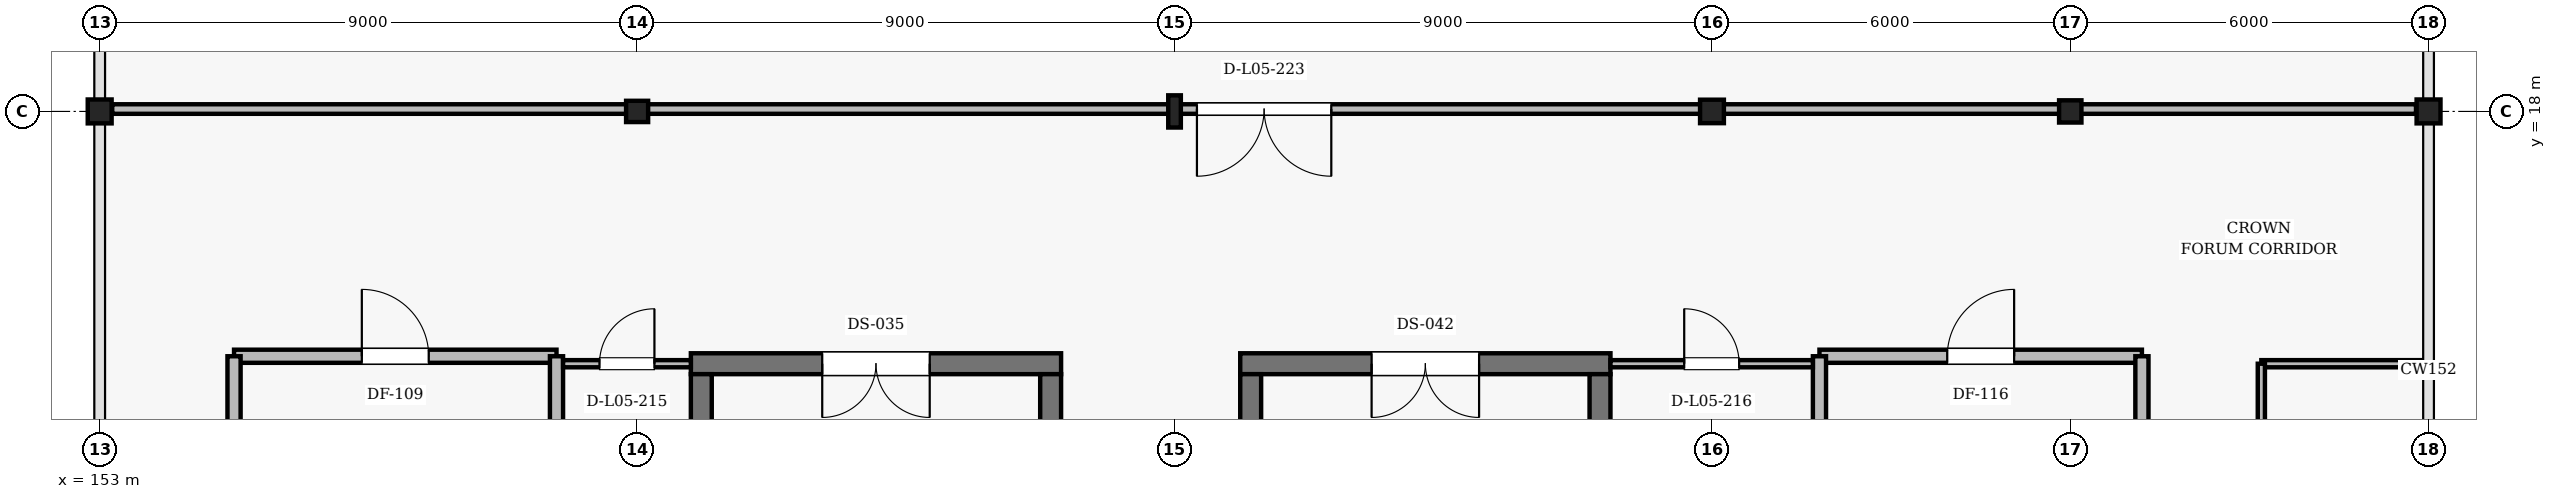
"""IFC4 building model, lengths in metres.
Left out: names, types, materials, properties, quantities, classifications, styles, units other than length and angle.
Written with IfcOpenShell. Run it as: python <this file> out.ifc"""

import sys

from ifc_helpers import new_model, si_unit, direction, frame, frame_2d, origin, origin_2d, place, context, subcontext, project, spatial, rectangle, hollow_rectangle, i_section, extrude, element, fill, save


model = new_model("IFC4")
c1 = context("Model", 3, precision=1e-05, world=origin(), true_north=direction((0.0, 1.0)))
c2 = subcontext(c1, "Body", "Model", "MODEL_VIEW")
j1 = project(units=[si_unit("LENGTHUNIT", "METRE"), si_unit("PLANEANGLEUNIT", "RADIAN")], contexts=[c1])
p1 = place(None, origin())
s1 = spatial("IfcSite", under=j1, at=p1, CompositionType="ELEMENT")
p2 = place(p1, origin())
s2 = spatial("IfcBuilding", under=s1, at=p2, CompositionType="ELEMENT")
p3 = place(p2, frame((0.0, 0.0, 25.2)))
s3 = spatial("IfcBuildingStorey", under=s2, at=p3, CompositionType="ELEMENT", Elevation=25.2)
p4 = place(p3, frame((153.0, 18.0, 0.0), z_axis=(0.0, 0.0, 1.0), x_axis=(1.0, 0.0, 0.0)))
e1 = element("IfcColumn", 1, at=p4, inside=s3, PredefinedType="COLUMN", context=c2, shape_type="SweptSolid", body=[
    extrude(hollow_rectangle(XDim=0.4, YDim=0.4, WallThickness=0.016, InnerFilletRadius=0.016, OuterFilletRadius=0.032, at=origin_2d()), origin(), (0.0, 0.0, 1.0), 4.8),
])
p5 = place(p3, frame((162.0, 18.0, 0.0), z_axis=(0.0, 0.0, 1.0), x_axis=(1.0, 0.0, 0.0)))
e2 = element("IfcColumn", 2, at=p5, inside=s3, PredefinedType="COLUMN", context=c2, shape_type="SweptSolid", body=[
    extrude(i_section(OverallWidth=0.369, OverallDepth=0.356, WebThickness=0.011, FlangeThickness=0.018, FilletRadius=0.015, at=origin_2d()), origin(), (0.0, 0.0, 1.0), 4.8),
])
p6 = place(p3, frame((171.0, 18.0, 0.0), z_axis=(0.0, 0.0, 1.0), x_axis=(1.0, 0.0, 0.0)))
e3 = element("IfcColumn", 3, at=p6, inside=s3, PredefinedType="COLUMN", context=c2, shape_type="SweptSolid", body=[
    extrude(i_section(OverallWidth=0.211, OverallDepth=0.539, WebThickness=0.012, FlangeThickness=0.019, FilletRadius=0.014, at=origin_2d()), origin(), (0.0, 0.0, 1.0), 4.8),
])
p7 = place(p3, frame((180.0, 18.0, 0.0), z_axis=(0.0, 0.0, 1.0), x_axis=(1.0, 0.0, 0.0)))
e4 = element("IfcColumn", 4, at=p7, inside=s3, PredefinedType="COLUMN", context=c2, shape_type="SweptSolid", body=[
    extrude(i_section(OverallWidth=0.399, OverallDepth=0.393, WebThickness=0.023, FlangeThickness=0.037, FilletRadius=0.018, at=origin_2d()), origin(), (0.0, 0.0, 1.0), 4.8),
])
p8 = place(p3, frame((186.0, 18.0, 0.0), z_axis=(0.0, 0.0, 1.0), x_axis=(1.0, 0.0, 0.0)))
e5 = element("IfcColumn", 5, at=p8, inside=s3, PredefinedType="COLUMN", context=c2, shape_type="SweptSolid", body=[
    extrude(i_section(OverallWidth=0.374, OverallDepth=0.372, WebThickness=0.016, FlangeThickness=0.026, FilletRadius=0.016, at=origin_2d()), origin(), (0.0, 0.0, 1.0), 4.8),
])
p9 = place(p3, frame((192.0, 18.0, 0.0), z_axis=(0.0, 0.0, 1.0), x_axis=(1.0, 0.0, 0.0)))
e6 = element("IfcColumn", 6, at=p9, inside=s3, PredefinedType="COLUMN", context=c2, shape_type="SweptSolid", body=[
    extrude(hollow_rectangle(XDim=0.4, YDim=0.4, WallThickness=0.016, InnerFilletRadius=0.016, OuterFilletRadius=0.032, at=origin_2d()), origin(), (0.0, 0.0, 1.0), 4.8),
])
p10 = place(p3, frame((169.1, 13.775, 0.0), z_axis=(0.0, 0.0, 1.0), x_axis=(-1.0, 0.0, 0.0)))
e7 = element("IfcWall", 7, at=p10, inside=s3, PredefinedType="SHEAR", context=c2, shape_type="SweptSolid", body=[
    extrude(rectangle(XDim=6.2, YDim=0.35, at=frame_2d((3.1, 0.0))), origin(), (0.0, 0.0, 1.0), 4.8),
])
p11 = place(p10, frame((2.2, 0.0, 0.0)))
e8 = element("IfcOpeningElement", 8, at=p11, cuts=e7, PredefinedType="OPENING", context=c2, shape_type="SweptSolid", body=[
    extrude(rectangle(XDim=1.8, YDim=2.2, at=frame_2d((0.9, 1.1))), frame((0.0, 0.185, 0.0), z_axis=(0.0, -1.0, 0.0), x_axis=(1.0, 0.0, 0.0)), (0.0, 0.0, 1.0), 0.37),
])
for number, where, z_axis, x_axis in (
    (9, (163.075, 13.6, 0.0), (0.0, 0.0, 1.0), (0.0, -1.0, 0.0)),
    (10, (168.925, 2.2, 0.0), (0.0, 0.0, 1.0), (0.0, 1.0, 0.0)),
):
    element("IfcWall", number, at=place(p3, frame(where, z_axis=z_axis, x_axis=x_axis)), inside=s3, PredefinedType="SHEAR", context=c2, shape_type="SweptSolid", body=[
        extrude(rectangle(XDim=11.4, YDim=0.35, at=frame_2d((5.7, 0.0))), origin(), (0.0, 0.0, 1.0), 4.8),
    ])
p12 = place(p3, frame((178.3, 13.775, 0.0), z_axis=(0.0, 0.0, 1.0), x_axis=(-1.0, 0.0, 0.0)))
e11 = element("IfcWall", 11, at=p12, inside=s3, PredefinedType="SHEAR", context=c2, shape_type="SweptSolid", body=[
    extrude(rectangle(XDim=6.2, YDim=0.35, at=frame_2d((3.1, 0.0))), origin(), (0.0, 0.0, 1.0), 4.8),
])
p13 = place(p12, frame((2.2, 0.0, 0.0)))
e12 = element("IfcOpeningElement", 12, at=p13, cuts=e11, PredefinedType="OPENING", context=c2, shape_type="SweptSolid", body=[
    extrude(rectangle(XDim=1.8, YDim=2.2, at=frame_2d((0.9, 1.1))), frame((0.0, 0.185, 0.0), z_axis=(0.0, -1.0, 0.0), x_axis=(1.0, 0.0, 0.0)), (0.0, 0.0, 1.0), 0.37),
])
for number, where, z_axis, x_axis in (
    (13, (172.275, 13.6, 0.0), (0.0, 0.0, 1.0), (0.0, -1.0, 0.0)),
    (14, (178.125, 2.2, 0.0), (0.0, 0.0, 1.0), (0.0, 1.0, 0.0)),
):
    element("IfcWall", number, at=place(p3, frame(where, z_axis=z_axis, x_axis=x_axis)), inside=s3, PredefinedType="SHEAR", context=c2, shape_type="SweptSolid", body=[
        extrude(rectangle(XDim=11.4, YDim=0.35, at=frame_2d((5.7, 0.0))), origin(), (0.0, 0.0, 1.0), 4.8),
    ])
p14 = place(p3, frame((155.25, 13.9, 0.0), z_axis=(0.0, 0.0, 1.0), x_axis=(1.0, 0.0, 0.0)))
e15 = element("IfcWall", 15, at=p14, inside=s3, PredefinedType="SOLIDWALL", context=c2, shape_type="SweptSolid", body=[
    extrude(rectangle(XDim=5.4, YDim=0.22, at=frame_2d((2.7, 0.0))), origin(), (0.0, 0.0, 1.0), 4.6),
])
p15 = place(p14, frame((2.14, 0.0, 0.0)))
e16 = element("IfcOpeningElement", 16, at=p15, cuts=e15, PredefinedType="OPENING", context=c2, shape_type="SweptSolid", body=[
    extrude(rectangle(XDim=1.12, YDim=2.2, at=frame_2d((0.56, 1.1))), frame((0.0, 0.12, 0.0), z_axis=(0.0, -1.0, 0.0), x_axis=(1.0, 0.0, 0.0)), (0.0, 0.0, 1.0), 0.24),
])
for number, where, z_axis, x_axis in (
    (17, (155.25, 10.85, 0.0), (0.0, 0.0, 1.0), (0.0, 1.0, 0.0)),
    (18, (160.65, 10.85, 0.0), (0.0, 0.0, 1.0), (0.0, 1.0, 0.0)),
):
    element("IfcWall", number, at=place(p3, frame(where, z_axis=z_axis, x_axis=x_axis)), inside=s3, PredefinedType="SOLIDWALL", context=c2, shape_type="SweptSolid", body=[
        extrude(rectangle(XDim=3.05, YDim=0.22, at=frame_2d((1.525, 0.0))), origin(), (0.0, 0.0, 1.0), 4.6),
    ])
p16 = place(p3, frame((181.8, 13.9, 0.0), z_axis=(0.0, 0.0, 1.0), x_axis=(1.0, 0.0, 0.0)))
e19 = element("IfcWall", 19, at=p16, inside=s3, PredefinedType="SOLIDWALL", context=c2, shape_type="SweptSolid", body=[
    extrude(rectangle(XDim=5.4, YDim=0.22, at=frame_2d((2.7, 0.0))), origin(), (0.0, 0.0, 1.0), 4.174),
])
p17 = place(p16, frame((2.14, 0.0, 0.0)))
e20 = element("IfcOpeningElement", 20, at=p17, cuts=e19, PredefinedType="OPENING", context=c2, shape_type="SweptSolid", body=[
    extrude(rectangle(XDim=1.12, YDim=2.2, at=frame_2d((0.56, 1.1))), frame((0.0, 0.12, 0.0), z_axis=(0.0, -1.0, 0.0), x_axis=(1.0, 0.0, 0.0)), (0.0, 0.0, 1.0), 0.24),
])
for number, where, z_axis, x_axis in (
    (21, (181.8, 10.85, 0.0), (0.0, 0.0, 1.0), (0.0, 1.0, 0.0)),
    (22, (187.2, 10.85, 0.0), (0.0, 0.0, 1.0), (0.0, 1.0, 0.0)),
):
    element("IfcWall", number, at=place(p3, frame(where, z_axis=z_axis, x_axis=x_axis)), inside=s3, PredefinedType="SOLIDWALL", context=c2, shape_type="SweptSolid", body=[
        extrude(rectangle(XDim=3.05, YDim=0.22, at=frame_2d((1.525, 0.0))), origin(), (0.0, 0.0, 1.0), 4.6),
    ])
p18 = place(p3, frame((160.76, 13.775, 0.0), z_axis=(0.0, 0.0, 1.0), x_axis=(1.0, 0.0, 0.0)))
e23 = element("IfcWall", 23, at=p18, inside=s3, PredefinedType="PARTITIONING", context=c2, shape_type="SweptSolid", body=[
    extrude(rectangle(XDim=2.14, YDim=0.12, at=frame_2d((1.07, 0.0))), origin(), (0.0, 0.0, 1.0), 4.101),
])
p19 = place(p18, frame((0.61, 0.0, 0.0)))
e24 = element("IfcOpeningElement", 24, at=p19, cuts=e23, PredefinedType="OPENING", context=c2, shape_type="SweptSolid", body=[
    extrude(rectangle(XDim=0.92, YDim=2.12, at=frame_2d((0.46, 1.06))), frame((0.0, 0.07, 0.0), z_axis=(0.0, -1.0, 0.0), x_axis=(1.0, 0.0, 0.0)), (0.0, 0.0, 1.0), 0.14),
])
p20 = place(p3, frame((178.3, 13.775, 0.0), z_axis=(0.0, 0.0, 1.0), x_axis=(1.0, 0.0, 0.0)))
e25 = element("IfcWall", 25, at=p20, inside=s3, PredefinedType="PARTITIONING", context=c2, shape_type="SweptSolid", body=[
    extrude(rectangle(XDim=3.39, YDim=0.12, at=frame_2d((1.695, 0.0))), origin(), (0.0, 0.0, 1.0), 4.012),
])
p21 = place(p20, frame((1.235, 0.0, 0.0)))
e26 = element("IfcOpeningElement", 26, at=p21, cuts=e25, PredefinedType="OPENING", context=c2, shape_type="SweptSolid", body=[
    extrude(rectangle(XDim=0.92, YDim=2.12, at=frame_2d((0.46, 1.06))), frame((0.0, 0.07, 0.0), z_axis=(0.0, -1.0, 0.0), x_axis=(1.0, 0.0, 0.0)), (0.0, 0.0, 1.0), 0.14),
])
p22 = place(p3, frame((189.2, 13.775, 0.0), z_axis=(0.0, 0.0, 1.0), x_axis=(1.0, 0.0, 0.0)))
e27 = element("IfcWall", 27, at=p22, inside=s3, PredefinedType="PARTITIONING", context=c2, shape_type="SweptSolid", body=[
    extrude(rectangle(XDim=2.788, YDim=0.12, at=frame_2d((1.394, 0.0))), origin(), (0.0, 0.0, 1.0), 4.246),
])
p23 = place(p3, frame((189.2, 9.65, 0.0), z_axis=(0.0, 0.0, 1.0), x_axis=(0.0, 1.0, 0.0)))
e28 = element("IfcWall", 28, at=p23, inside=s3, PredefinedType="PARTITIONING", context=c2, shape_type="SweptSolid", body=[
    extrude(rectangle(XDim=4.125, YDim=0.12, at=frame_2d((2.062, 0.0))), origin(), (0.0, 0.0, 1.0), 4.6),
])
p24 = place(p23, frame((1.552, 0.0, 0.0)))
e29 = element("IfcOpeningElement", 29, at=p24, cuts=e28, PredefinedType="OPENING", context=c2, shape_type="SweptSolid", body=[
    extrude(rectangle(XDim=1.02, YDim=2.16, at=frame_2d((0.51, 1.08))), frame((0.0, 0.07, 0.0), z_axis=(0.0, -1.0, 0.0), x_axis=(1.0, 0.0, 0.0)), (0.0, 0.0, 1.0), 0.14),
])
p25 = place(p3, frame((191.79, 18.04, 0.0), z_axis=(0.0, 0.0, 1.0), x_axis=(-1.0, 0.0, 0.0)))
e30 = element("IfcWall", 30, at=p25, inside=s3, PredefinedType="PARTITIONING", context=c2, shape_type="SweptSolid", body=[
    extrude(rectangle(XDim=38.58, YDim=0.16, at=frame_2d((19.29, 0.0))), origin(), (0.0, 0.0, 1.0), 3.794),
])
p26 = place(p25, frame((18.165, 0.0, 0.0)))
e31 = element("IfcOpeningElement", 31, at=p26, cuts=e30, PredefinedType="OPENING", context=c2, shape_type="SweptSolid", body=[
    extrude(rectangle(XDim=2.25, YDim=2.4, at=frame_2d((1.125, 1.2))), frame((0.0, 0.09, 0.0), z_axis=(0.0, -1.0, 0.0), x_axis=(1.0, 0.0, 0.0)), (0.0, 0.0, 1.0), 0.18),
])
p27 = place(p11, origin())
e32 = element("IfcDoor", 32, at=p27, inside=s3, OperationType="DOUBLE_DOOR_SINGLE_SWING", PredefinedType="DOOR", context=c2, shape_type="SweptSolid", body=[
    extrude(rectangle(XDim=1.8, YDim=2.2, at=frame_2d((0.9, 1.1))), frame((0.0, 0.025, 0.0), z_axis=(0.0, -1.0, 0.0), x_axis=(1.0, 0.0, 0.0)), (0.0, 0.0, 1.0), 0.05),
])
fill(e8, e32)
p28 = place(p13, origin())
e33 = element("IfcDoor", 33, at=p28, inside=s3, OperationType="DOUBLE_DOOR_SINGLE_SWING", PredefinedType="DOOR", context=c2, shape_type="SweptSolid", body=[
    extrude(rectangle(XDim=1.8, YDim=2.2, at=frame_2d((0.9, 1.1))), frame((0.0, 0.025, 0.0), z_axis=(0.0, -1.0, 0.0), x_axis=(1.0, 0.0, 0.0)), (0.0, 0.0, 1.0), 0.05),
])
fill(e12, e33)
p29 = place(p15, origin())
e34 = element("IfcDoor", 34, at=p29, inside=s3, OperationType="SINGLE_SWING_LEFT", PredefinedType="DOOR", context=c2, shape_type="SweptSolid", body=[
    extrude(rectangle(XDim=1.12, YDim=2.2, at=frame_2d((0.56, 1.1))), frame((0.0, 0.025, 0.0), z_axis=(0.0, -1.0, 0.0), x_axis=(1.0, 0.0, 0.0)), (0.0, 0.0, 1.0), 0.05),
])
fill(e16, e34)
p30 = place(p17, origin())
e35 = element("IfcDoor", 35, at=p30, inside=s3, OperationType="SINGLE_SWING_RIGHT", PredefinedType="DOOR", context=c2, shape_type="SweptSolid", body=[
    extrude(rectangle(XDim=1.12, YDim=2.2, at=frame_2d((0.56, 1.1))), frame((0.0, 0.025, 0.0), z_axis=(0.0, -1.0, 0.0), x_axis=(1.0, 0.0, 0.0)), (0.0, 0.0, 1.0), 0.05),
])
fill(e20, e35)
p31 = place(p19, origin())
e36 = element("IfcDoor", 36, at=p31, inside=s3, OperationType="SINGLE_SWING_RIGHT", PredefinedType="DOOR", context=c2, shape_type="SweptSolid", body=[
    extrude(rectangle(XDim=0.92, YDim=2.12, at=frame_2d((0.46, 1.06))), frame((0.0, 0.025, 0.0), z_axis=(0.0, -1.0, 0.0), x_axis=(1.0, 0.0, 0.0)), (0.0, 0.0, 1.0), 0.05),
])
fill(e24, e36)
p32 = place(p21, origin())
e37 = element("IfcDoor", 37, at=p32, inside=s3, OperationType="SINGLE_SWING_LEFT", PredefinedType="DOOR", context=c2, shape_type="SweptSolid", body=[
    extrude(rectangle(XDim=0.92, YDim=2.12, at=frame_2d((0.46, 1.06))), frame((0.0, 0.025, 0.0), z_axis=(0.0, -1.0, 0.0), x_axis=(1.0, 0.0, 0.0)), (0.0, 0.0, 1.0), 0.05),
])
fill(e26, e37)
p33 = place(p26, origin())
e38 = element("IfcDoor", 38, at=p33, inside=s3, OperationType="DOUBLE_DOOR_SINGLE_SWING", PredefinedType="DOOR", context=c2, shape_type="SweptSolid", body=[
    extrude(rectangle(XDim=2.25, YDim=2.4, at=frame_2d((1.125, 1.2))), frame((0.0, 0.025, 0.0), z_axis=(0.0, -1.0, 0.0), x_axis=(1.0, 0.0, 0.0)), (0.0, 0.0, 1.0), 0.05),
])
fill(e31, e38)
save(model, sys.argv[1])
